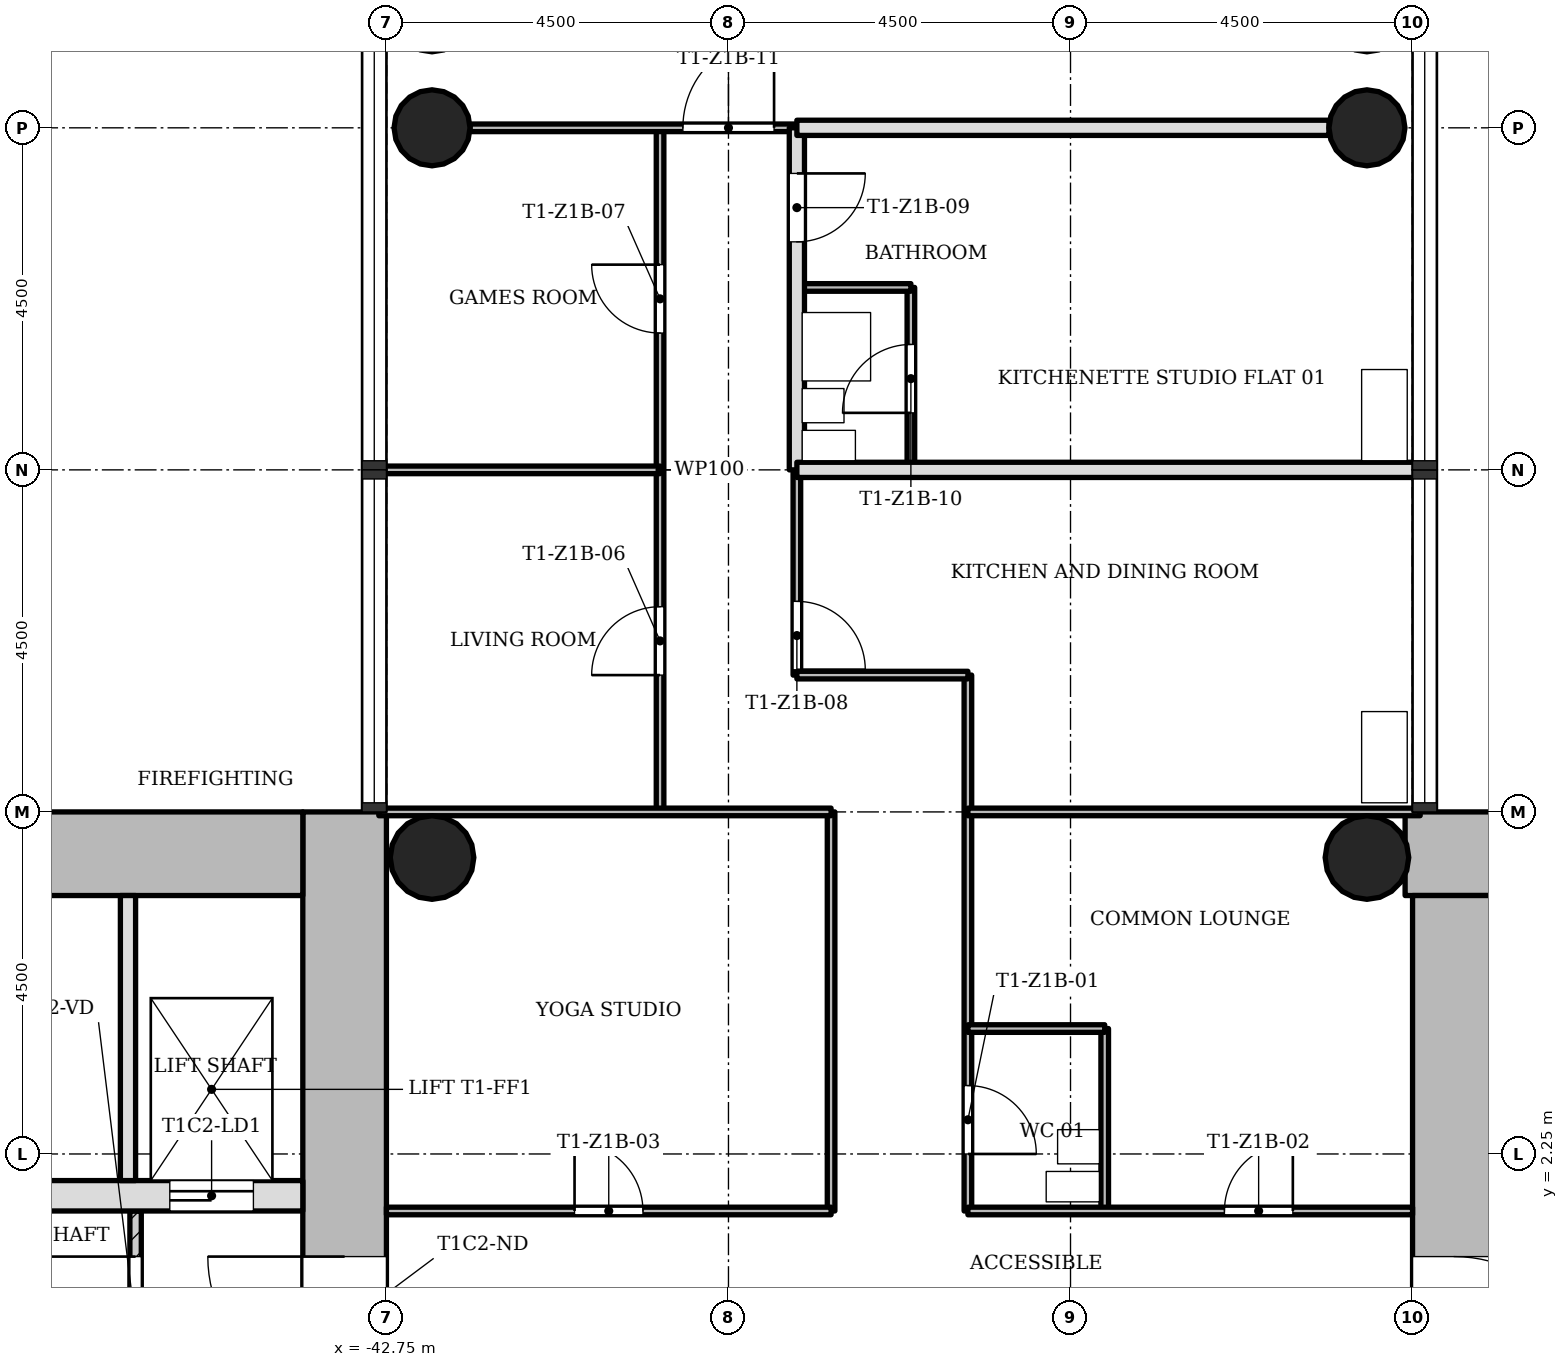
"""IFC4 building model, lengths in metres.
Left out: names, types, materials, properties, quantities, classifications, styles, units other than length and angle.
Written with IfcOpenShell. Run it as: python <this file> out.ifc"""

import sys

from ifc_helpers import new_model, si_unit, direction, frame, frame_2d, origin, origin_2d, place, context, subcontext, project, spatial, rectangle, hollow_circle, extrude, element, fill, save


model = new_model("IFC4")
c1 = context("Model", 3, precision=1e-05, world=origin(), true_north=direction((0.0, 1.0)))
c2 = subcontext(c1, "Body", "Model", "MODEL_VIEW")
j1 = project(units=[si_unit("LENGTHUNIT", "METRE"), si_unit("PLANEANGLEUNIT", "RADIAN")], contexts=[c1])
p1 = place(None, origin())
s1 = spatial("IfcSite", under=j1, at=p1, CompositionType="ELEMENT")
p2 = place(p1, origin())
s2 = spatial("IfcBuilding", under=s1, at=p2, CompositionType="ELEMENT")
p3 = place(p2, frame((0.0, 0.0, 34.7)))
s3 = spatial("IfcBuildingStorey", under=s2, at=p3, CompositionType="ELEMENT", Elevation=34.7)
p4 = place(p3, frame((-21.35, 6.2, 0.0), z_axis=(0.0, 0.0, 1.0), x_axis=(-1.0, 0.0, 0.0)))
e1 = element("IfcWall", 1, at=p4, inside=s3, PredefinedType="SHEAR", context=c2, shape_type="SweptSolid", body=[
    extrude(rectangle(XDim=7.998, YDim=1.1, at=frame_2d((3.999, 0.0))), origin(), (0.0, 0.0, 1.0), 3.4),
])
p5 = place(p3, frame((-28.7, 5.65, 0.0), z_axis=(0.0, 0.0, 1.0), x_axis=(0.0, -1.0, 0.0)))
e2 = element("IfcWall", 2, at=p5, inside=s3, PredefinedType="SHEAR", context=c2, shape_type="SweptSolid", body=[
    extrude(rectangle(XDim=12.4, YDim=1.1, at=frame_2d((6.2, 0.0))), origin(), (0.0, 0.0, 1.0), 3.4),
])
p6 = place(p5, frame((4.75, 0.0, 0.0)))
e3 = element("IfcOpeningElement", 3, at=p6, cuts=e2, PredefinedType="OPENING", context=c2, shape_type="SweptSolid", body=[
    extrude(rectangle(XDim=1.8, YDim=2.1, at=frame_2d((0.9, 1.05))), frame((0.0, 0.56, 0.0), z_axis=(0.0, -1.0, 0.0), x_axis=(1.0, 0.0, 0.0)), (0.0, 0.0, 1.0), 1.12),
])
p7 = place(p3, frame((-43.3, -5.65, 0.0), z_axis=(0.0, 0.0, 1.0), x_axis=(0.0, 1.0, 0.0)))
e4 = element("IfcWall", 4, at=p7, inside=s3, PredefinedType="SHEAR", context=c2, shape_type="SweptSolid", body=[
    extrude(rectangle(XDim=12.4, YDim=1.1, at=frame_2d((6.2, 0.0))), origin(), (0.0, 0.0, 1.0), 3.4),
])
p8 = place(p7, frame((4.75, 0.0, 0.0)))
e5 = element("IfcOpeningElement", 5, at=p8, cuts=e4, PredefinedType="OPENING", context=c2, shape_type="SweptSolid", body=[
    extrude(rectangle(XDim=1.8, YDim=2.1, at=frame_2d((0.9, 1.05))), frame((0.0, 0.56, 0.0), z_axis=(0.0, -1.0, 0.0), x_axis=(1.0, 0.0, 0.0)), (0.0, 0.0, 1.0), 1.12),
])
p9 = place(p3, frame((-43.85, 6.2, 0.0), z_axis=(0.0, 0.0, 1.0), x_axis=(-1.0, 0.0, 0.0)))
e6 = element("IfcWall", 6, at=p9, inside=s3, PredefinedType="SHEAR", context=c2, shape_type="SweptSolid", body=[
    extrude(rectangle(XDim=7.9, YDim=1.1, at=frame_2d((3.95, 0.0))), origin(), (0.0, 0.0, 1.0), 3.4),
])
p10 = place(p3, frame((-50.65, 1.7, 0.0), z_axis=(0.0, 0.0, 1.0), x_axis=(1.0, 0.0, 0.0)))
e7 = element("IfcWall", 7, at=p10, inside=s3, PredefinedType="SHEAR", context=c2, shape_type="SweptSolid", body=[
    extrude(rectangle(XDim=6.8, YDim=0.4, at=frame_2d((3.4, 0.0))), origin(), (0.0, 0.0, 1.0), 3.4),
])
p11 = place(p10, frame((5.05, 0.0, 0.0)))
e8 = element("IfcOpeningElement", 8, at=p11, cuts=e7, PredefinedType="OPENING", context=c2, shape_type="SweptSolid", body=[
    extrude(rectangle(XDim=1.1, YDim=2.1, at=frame_2d((0.55, 1.05))), frame((0.0, 0.21, 0.0), z_axis=(0.0, -1.0, 0.0), x_axis=(1.0, 0.0, 0.0)), (0.0, 0.0, 1.0), 0.42),
])
for number, where, z_axis, x_axis in (
    (9, (-29.85, 15.75, 0.0), (0.0, 0.0, 1.0), (1.0, 0.0, 0.0)),
    (10, (-42.15, 15.75, 0.0), (0.0, 0.0, 1.0), (1.0, 0.0, 0.0)),
):
    element("IfcColumn", number, at=place(p3, frame(where, z_axis=z_axis, x_axis=x_axis)), inside=s3, PredefinedType="COLUMN", context=c2, shape_type="SweptSolid", body=[
        extrude(hollow_circle(Radius=0.5, WallThickness=0.036, at=origin_2d()), origin(), (0.0, 0.0, 1.0), 3.4),
    ])
for number, where, z_axis, x_axis in (
    (11, (-29.85, 6.15, 0.0), (0.0, 0.0, 1.0), (1.0, 0.0, 0.0)),
    (12, (-42.15, 6.15, 0.0), (0.0, 0.0, 1.0), (1.0, 0.0, 0.0)),
):
    element("IfcColumn", number, at=place(p3, frame(where, z_axis=z_axis, x_axis=x_axis)), inside=s3, PredefinedType="COLUMN", context=c2, shape_type="SweptSolid", body=[
        extrude(hollow_circle(Radius=0.55, WallThickness=0.04, at=origin_2d()), origin(), (0.0, 0.0, 1.0), 3.4),
    ])
p12 = place(p3, frame((-46.05, 1.5, 0.0), z_axis=(0.0, 0.0, 1.0), x_axis=(0.0, -1.0, 0.0)))
e13 = element("IfcWall", 13, at=p12, inside=s3, PredefinedType="PARTITIONING", context=c2, shape_type="SweptSolid", body=[
    extrude(rectangle(XDim=3.0, YDim=0.15, at=frame_2d((1.5, 0.0))), origin(), (0.0, 0.0, 1.0), 3.0),
])
p13 = place(p12, frame((0.6, 0.0, 0.0)))
e14 = element("IfcOpeningElement", 14, at=p13, cuts=e13, PredefinedType="OPENING", context=c2, shape_type="SweptSolid", body=[
    extrude(rectangle(XDim=1.8, YDim=2.1, at=frame_2d((0.9, 1.05))), frame((0.0, 0.085, 0.0), z_axis=(0.0, -1.0, 0.0), x_axis=(1.0, 0.0, 0.0)), (0.0, 0.0, 1.0), 0.17),
])
p14 = place(p3, frame((-46.15, 5.65, 0.0), z_axis=(0.0, 0.0, 1.0), x_axis=(0.0, -1.0, 0.0)))
e15 = element("IfcWall", 15, at=p14, inside=s3, PredefinedType="SOLIDWALL", context=c2, shape_type="SweptSolid", body=[
    extrude(rectangle(XDim=3.75, YDim=0.2, at=frame_2d((1.875, 0.0))), origin(), (0.0, 0.0, 1.0), 3.0),
])
p15 = place(p3, frame((-39.15, 6.75, 0.0), z_axis=(0.0, 0.0, 1.0), x_axis=(0.0, 1.0, 0.0)))
e16 = element("IfcWall", 16, at=p15, inside=s3, PredefinedType="PARTITIONING", context=c2, shape_type="SweptSolid", body=[
    extrude(rectangle(XDim=9.0, YDim=0.1, at=frame_2d((4.5, 0.0))), origin(), (0.0, 0.0, 1.0), 3.0),
])
p16 = place(p15, frame((1.8, 0.0, 0.0)))
e17 = element("IfcOpeningElement", 17, at=p16, cuts=e16, PredefinedType="OPENING", context=c2, shape_type="SweptSolid", body=[
    extrude(rectangle(XDim=0.9, YDim=2.1, at=frame_2d((0.45, 1.05))), frame((0.0, 0.06, 0.0), z_axis=(0.0, -1.0, 0.0), x_axis=(1.0, 0.0, 0.0)), (0.0, 0.0, 1.0), 0.12),
])
p17 = place(p15, frame((6.3, 0.0, 0.0)))
e18 = element("IfcOpeningElement", 18, at=p17, cuts=e16, PredefinedType="OPENING", context=c2, shape_type="SweptSolid", body=[
    extrude(rectangle(XDim=0.9, YDim=2.1, at=frame_2d((0.45, 1.05))), frame((0.0, 0.06, 0.0), z_axis=(0.0, -1.0, 0.0), x_axis=(1.0, 0.0, 0.0)), (0.0, 0.0, 1.0), 0.12),
])
p18 = place(p3, frame((-37.35, 8.55, 0.0), z_axis=(0.0, 0.0, 1.0), x_axis=(0.0, 1.0, 0.0)))
e19 = element("IfcWall", 19, at=p18, inside=s3, PredefinedType="PARTITIONING", context=c2, shape_type="SweptSolid", body=[
    extrude(rectangle(XDim=2.7, YDim=0.1, at=frame_2d((1.35, 0.0))), origin(), (0.0, 0.0, 1.0), 3.0),
])
p19 = place(p18, frame((0.07, 0.0, 0.0)))
e20 = element("IfcOpeningElement", 20, at=p19, cuts=e19, PredefinedType="OPENING", context=c2, shape_type="SweptSolid", body=[
    extrude(rectangle(XDim=0.9, YDim=2.1, at=frame_2d((0.45, 1.05))), frame((0.0, 0.06, 0.0), z_axis=(0.0, -1.0, 0.0), x_axis=(1.0, 0.0, 0.0)), (0.0, 0.0, 1.0), 0.12),
])
p20 = place(p3, frame((-37.35, 11.25, 0.0), z_axis=(0.0, 0.0, 1.0), x_axis=(0.0, 1.0, 0.0)))
e21 = element("IfcWall", 21, at=p20, inside=s3, PredefinedType="SOLIDWALL", context=c2, shape_type="SweptSolid", body=[
    extrude(rectangle(XDim=4.5, YDim=0.2, at=frame_2d((2.25, 0.0))), origin(), (0.0, 0.0, 1.0), 3.0),
])
p21 = place(p20, frame((3.0, 0.0, 0.0)))
e22 = element("IfcOpeningElement", 22, at=p21, cuts=e21, PredefinedType="OPENING", context=c2, shape_type="SweptSolid", body=[
    extrude(rectangle(XDim=0.9, YDim=2.1, at=frame_2d((0.45, 1.05))), frame((0.0, 0.11, 0.0), z_axis=(0.0, -1.0, 0.0), x_axis=(1.0, 0.0, 0.0)), (0.0, 0.0, 1.0), 0.22),
])
p22 = place(p3, frame((-36.9, 1.5, 0.0), z_axis=(0.0, 0.0, 1.0), x_axis=(0.0, 1.0, 0.0)))
e23 = element("IfcWall", 23, at=p22, inside=s3, PredefinedType="PARTITIONING", context=c2, shape_type="SweptSolid", body=[
    extrude(rectangle(XDim=5.25, YDim=0.1, at=frame_2d((2.625, 0.0))), origin(), (0.0, 0.0, 1.0), 3.0),
])
p23 = place(p3, frame((-35.85, 11.25, 0.0), z_axis=(0.0, 0.0, 1.0), x_axis=(0.0, 1.0, 0.0)))
e24 = element("IfcWall", 24, at=p23, inside=s3, PredefinedType="PARTITIONING", context=c2, shape_type="SweptSolid", body=[
    extrude(rectangle(XDim=2.4, YDim=0.1, at=frame_2d((1.2, 0.0))), origin(), (0.0, 0.0, 1.0), 3.0),
])
p24 = place(p23, frame((0.75, 0.0, 0.0)))
e25 = element("IfcOpeningElement", 25, at=p24, cuts=e24, PredefinedType="OPENING", context=c2, shape_type="SweptSolid", body=[
    extrude(rectangle(XDim=0.9, YDim=2.1, at=frame_2d((0.45, 1.05))), frame((0.0, 0.06, 0.0), z_axis=(0.0, -1.0, 0.0), x_axis=(1.0, 0.0, 0.0)), (0.0, 0.0, 1.0), 0.12),
])
p25 = place(p3, frame((-35.1, 1.5, 0.0), z_axis=(0.0, 0.0, 1.0), x_axis=(0.0, 1.0, 0.0)))
e26 = element("IfcWall", 26, at=p25, inside=s3, PredefinedType="PARTITIONING", context=c2, shape_type="SweptSolid", body=[
    extrude(rectangle(XDim=7.05, YDim=0.1, at=frame_2d((3.525, 0.0))), origin(), (0.0, 0.0, 1.0), 3.0),
])
p26 = place(p25, frame((0.75, 0.0, 0.0)))
e27 = element("IfcOpeningElement", 27, at=p26, cuts=e26, PredefinedType="OPENING", context=c2, shape_type="SweptSolid", body=[
    extrude(rectangle(XDim=0.9, YDim=2.1, at=frame_2d((0.45, 1.05))), frame((0.0, 0.06, 0.0), z_axis=(0.0, -1.0, 0.0), x_axis=(1.0, 0.0, 0.0)), (0.0, 0.0, 1.0), 0.12),
])
p27 = place(p3, frame((-33.3, 1.5, 0.0), z_axis=(0.0, 0.0, 1.0), x_axis=(0.0, 1.0, 0.0)))
e28 = element("IfcWall", 28, at=p27, inside=s3, PredefinedType="PARTITIONING", context=c2, shape_type="SweptSolid", body=[
    extrude(rectangle(XDim=2.4, YDim=0.1, at=frame_2d((1.2, 0.0))), origin(), (0.0, 0.0, 1.0), 3.0),
])
p28 = place(p3, frame((-42.75, 1.5, 0.0), z_axis=(0.0, 0.0, 1.0), x_axis=(1.0, 0.0, 0.0)))
e29 = element("IfcWall", 29, at=p28, inside=s3, PredefinedType="PARTITIONING", context=c2, shape_type="SweptSolid", body=[
    extrude(rectangle(XDim=5.85, YDim=0.1, at=frame_2d((2.925, 0.0))), origin(), (0.0, 0.0, 1.0), 3.0),
])
p29 = place(p28, frame((2.475, 0.0, 0.0)))
e30 = element("IfcOpeningElement", 30, at=p29, cuts=e29, PredefinedType="OPENING", context=c2, shape_type="SweptSolid", body=[
    extrude(rectangle(XDim=0.9, YDim=2.1, at=frame_2d((0.45, 1.05))), frame((0.0, 0.06, 0.0), z_axis=(0.0, -1.0, 0.0), x_axis=(1.0, 0.0, 0.0)), (0.0, 0.0, 1.0), 0.12),
])
p30 = place(p3, frame((-35.1, 1.5, 0.0), z_axis=(0.0, 0.0, 1.0), x_axis=(1.0, 0.0, 0.0)))
e31 = element("IfcWall", 31, at=p30, inside=s3, PredefinedType="PARTITIONING", context=c2, shape_type="SweptSolid", body=[
    extrude(rectangle(XDim=5.85, YDim=0.1, at=frame_2d((2.925, 0.0))), origin(), (0.0, 0.0, 1.0), 3.0),
])
p31 = place(p30, frame((3.375, 0.0, 0.0)))
e32 = element("IfcOpeningElement", 32, at=p31, cuts=e31, PredefinedType="OPENING", context=c2, shape_type="SweptSolid", body=[
    extrude(rectangle(XDim=0.9, YDim=2.1, at=frame_2d((0.45, 1.05))), frame((0.0, 0.06, 0.0), z_axis=(0.0, -1.0, 0.0), x_axis=(1.0, 0.0, 0.0)), (0.0, 0.0, 1.0), 0.12),
])
p32 = place(p3, frame((-35.1, 3.9, 0.0), z_axis=(0.0, 0.0, 1.0), x_axis=(1.0, 0.0, 0.0)))
e33 = element("IfcWall", 33, at=p32, inside=s3, PredefinedType="PARTITIONING", context=c2, shape_type="SweptSolid", body=[
    extrude(rectangle(XDim=1.8, YDim=0.1, at=frame_2d((0.9, 0.0))), origin(), (0.0, 0.0, 1.0), 3.0),
])
for number, where, z_axis, x_axis in (
    (34, (-42.85, 6.75, 0.0), (0.0, 0.0, 1.0), (1.0, 0.0, 0.0)),
    (35, (-35.1, 6.75, 0.0), (0.0, 0.0, 1.0), (1.0, 0.0, 0.0)),
):
    element("IfcWall", number, at=place(p3, frame(where, z_axis=z_axis, x_axis=x_axis)), inside=s3, PredefinedType="PARTITIONING", context=c2, shape_type="SweptSolid", body=[
        extrude(rectangle(XDim=5.95, YDim=0.1, at=frame_2d((2.975, 0.0))), origin(), (0.0, 0.0, 1.0), 3.0),
    ])
p33 = place(p3, frame((-37.35, 8.55, 0.0), z_axis=(0.0, 0.0, 1.0), x_axis=(1.0, 0.0, 0.0)))
e36 = element("IfcWall", 36, at=p33, inside=s3, PredefinedType="PARTITIONING", context=c2, shape_type="SweptSolid", body=[
    extrude(rectangle(XDim=2.25, YDim=0.1, at=frame_2d((1.125, 0.0))), origin(), (0.0, 0.0, 1.0), 3.0),
])
p34 = place(p3, frame((-42.85, 11.25, 0.0), z_axis=(0.0, 0.0, 1.0), x_axis=(1.0, 0.0, 0.0)))
e37 = element("IfcWall", 37, at=p34, inside=s3, PredefinedType="PARTITIONING", context=c2, shape_type="SweptSolid", body=[
    extrude(rectangle(XDim=3.7, YDim=0.1, at=frame_2d((1.85, 0.0))), origin(), (0.0, 0.0, 1.0), 3.0),
])
p35 = place(p3, frame((-37.35, 11.25, 0.0), z_axis=(0.0, 0.0, 1.0), x_axis=(1.0, 0.0, 0.0)))
e38 = element("IfcWall", 38, at=p35, inside=s3, PredefinedType="SOLIDWALL", context=c2, shape_type="SweptSolid", body=[
    extrude(rectangle(XDim=8.2, YDim=0.2, at=frame_2d((4.1, 0.0))), origin(), (0.0, 0.0, 1.0), 3.0),
])
p36 = place(p3, frame((-37.35, 13.65, 0.0), z_axis=(0.0, 0.0, 1.0), x_axis=(1.0, 0.0, 0.0)))
e39 = element("IfcWall", 39, at=p36, inside=s3, PredefinedType="PARTITIONING", context=c2, shape_type="SweptSolid", body=[
    extrude(rectangle(XDim=1.5, YDim=0.1, at=frame_2d((0.75, 0.0))), origin(), (0.0, 0.0, 1.0), 3.0),
])
p37 = place(p3, frame((-41.65, 15.75, 0.0), z_axis=(0.0, 0.0, 1.0), x_axis=(1.0, 0.0, 0.0)))
e40 = element("IfcWall", 40, at=p37, inside=s3, PredefinedType="PARTITIONING", context=c2, shape_type="SweptSolid", body=[
    extrude(rectangle(XDim=4.3, YDim=0.1, at=frame_2d((2.15, 0.0))), origin(), (0.0, 0.0, 1.0), 3.0),
])
p38 = place(p37, frame((2.8, 0.0, 0.0)))
e41 = element("IfcOpeningElement", 41, at=p38, cuts=e40, PredefinedType="OPENING", context=c2, shape_type="SweptSolid", body=[
    extrude(rectangle(XDim=1.2, YDim=2.1, at=frame_2d((0.6, 1.05))), frame((0.0, 0.06, 0.0), z_axis=(0.0, -1.0, 0.0), x_axis=(1.0, 0.0, 0.0)), (0.0, 0.0, 1.0), 0.12),
])
p39 = place(p3, frame((-37.35, 15.75, 0.0), z_axis=(0.0, 0.0, 1.0), x_axis=(1.0, 0.0, 0.0)))
e42 = element("IfcWall", 42, at=p39, inside=s3, PredefinedType="SOLIDWALL", context=c2, shape_type="SweptSolid", body=[
    extrude(rectangle(XDim=7.0, YDim=0.2, at=frame_2d((3.5, 0.0))), origin(), (0.0, 0.0, 1.0), 3.0),
])
p40 = place(p13, origin())
e43 = element("IfcDoor", 43, at=p40, inside=s3, OperationType="SINGLE_SWING_LEFT", PredefinedType="DOOR", context=c2, shape_type="SweptSolid", body=[
    extrude(rectangle(XDim=1.8, YDim=2.1, at=frame_2d((0.9, 1.05))), frame((0.0, 0.025, 0.0), z_axis=(0.0, -1.0, 0.0), x_axis=(1.0, 0.0, 0.0)), (0.0, 0.0, 1.0), 0.05),
])
fill(e14, e43)
p41 = place(p26, origin())
e44 = element("IfcDoor", 44, at=p41, inside=s3, OperationType="SINGLE_SWING_LEFT", PredefinedType="DOOR", context=c2, shape_type="SweptSolid", body=[
    extrude(rectangle(XDim=0.9, YDim=2.1, at=frame_2d((0.45, 1.05))), frame((0.0, 0.025, 0.0), z_axis=(0.0, -1.0, 0.0), x_axis=(1.0, 0.0, 0.0)), (0.0, 0.0, 1.0), 0.05),
])
fill(e27, e44)
p42 = place(p31, origin())
e45 = element("IfcDoor", 45, at=p42, inside=s3, OperationType="SINGLE_SWING_LEFT", PredefinedType="DOOR", context=c2, shape_type="SweptSolid", body=[
    extrude(rectangle(XDim=0.9, YDim=2.1, at=frame_2d((0.45, 1.05))), frame((0.0, 0.025, 0.0), z_axis=(0.0, -1.0, 0.0), x_axis=(1.0, 0.0, 0.0)), (0.0, 0.0, 1.0), 0.05),
])
fill(e32, e45)
p43 = place(p29, origin())
e46 = element("IfcDoor", 46, at=p43, inside=s3, OperationType="SINGLE_SWING_RIGHT", PredefinedType="DOOR", context=c2, shape_type="SweptSolid", body=[
    extrude(rectangle(XDim=0.9, YDim=2.1, at=frame_2d((0.45, 1.05))), frame((0.0, 0.025, 0.0), z_axis=(0.0, -1.0, 0.0), x_axis=(1.0, 0.0, 0.0)), (0.0, 0.0, 1.0), 0.05),
])
fill(e30, e46)
p44 = place(p16, origin())
e47 = element("IfcDoor", 47, at=p44, inside=s3, OperationType="SINGLE_SWING_RIGHT", PredefinedType="DOOR", context=c2, shape_type="SweptSolid", body=[
    extrude(rectangle(XDim=0.9, YDim=2.1, at=frame_2d((0.45, 1.05))), frame((0.0, 0.025, 0.0), z_axis=(0.0, -1.0, 0.0), x_axis=(1.0, 0.0, 0.0)), (0.0, 0.0, 1.0), 0.05),
])
fill(e17, e47)
p45 = place(p17, origin())
e48 = element("IfcDoor", 48, at=p45, inside=s3, OperationType="SINGLE_SWING_LEFT", PredefinedType="DOOR", context=c2, shape_type="SweptSolid", body=[
    extrude(rectangle(XDim=0.9, YDim=2.1, at=frame_2d((0.45, 1.05))), frame((0.0, 0.025, 0.0), z_axis=(0.0, -1.0, 0.0), x_axis=(1.0, 0.0, 0.0)), (0.0, 0.0, 1.0), 0.05),
])
fill(e18, e48)
p46 = place(p19, origin())
e49 = element("IfcDoor", 49, at=p46, inside=s3, OperationType="SINGLE_SWING_LEFT", PredefinedType="DOOR", context=c2, shape_type="SweptSolid", body=[
    extrude(rectangle(XDim=0.9, YDim=2.1, at=frame_2d((0.45, 1.05))), frame((0.0, 0.025, 0.0), z_axis=(0.0, -1.0, 0.0), x_axis=(1.0, 0.0, 0.0)), (0.0, 0.0, 1.0), 0.05),
])
fill(e20, e49)
p47 = place(p21, origin())
e50 = element("IfcDoor", 50, at=p47, inside=s3, OperationType="SINGLE_SWING_RIGHT", PredefinedType="DOOR", context=c2, shape_type="SweptSolid", body=[
    extrude(rectangle(XDim=0.9, YDim=2.1, at=frame_2d((0.45, 1.05))), frame((0.0, 0.025, 0.0), z_axis=(0.0, -1.0, 0.0), x_axis=(1.0, 0.0, 0.0)), (0.0, 0.0, 1.0), 0.05),
])
fill(e22, e50)
p48 = place(p24, origin())
e51 = element("IfcDoor", 51, at=p48, inside=s3, OperationType="SINGLE_SWING_RIGHT", PredefinedType="DOOR", context=c2, shape_type="SweptSolid", body=[
    extrude(rectangle(XDim=0.9, YDim=2.1, at=frame_2d((0.45, 1.05))), frame((0.0, 0.025, 0.0), z_axis=(0.0, -1.0, 0.0), x_axis=(1.0, 0.0, 0.0)), (0.0, 0.0, 1.0), 0.05),
])
fill(e25, e51)
p49 = place(p38, origin())
e52 = element("IfcDoor", 52, at=p49, inside=s3, OperationType="SINGLE_SWING_LEFT", PredefinedType="DOOR", context=c2, shape_type="SweptSolid", body=[
    extrude(rectangle(XDim=1.2, YDim=2.1, at=frame_2d((0.6, 1.05))), frame((0.0, 0.025, 0.0), z_axis=(0.0, -1.0, 0.0), x_axis=(1.0, 0.0, 0.0)), (0.0, 0.0, 1.0), 0.05),
])
fill(e41, e52)
p50 = place(p6, origin())
e53 = element("IfcDoor", 53, at=p50, inside=s3, OperationType="SINGLE_SWING_LEFT", PredefinedType="DOOR", context=c2, shape_type="SweptSolid", body=[
    extrude(rectangle(XDim=1.8, YDim=2.1, at=frame_2d((0.9, 1.05))), frame((0.0, 0.025, 0.0), z_axis=(0.0, -1.0, 0.0), x_axis=(1.0, 0.0, 0.0)), (0.0, 0.0, 1.0), 0.05),
])
fill(e3, e53)
p51 = place(p11, origin())
e54 = element("IfcDoor", 54, at=p51, inside=s3, OperationType="SLIDING_TO_LEFT", PredefinedType="DOOR", context=c2, shape_type="SweptSolid", body=[
    extrude(rectangle(XDim=1.1, YDim=2.1, at=frame_2d((0.55, 1.05))), frame((0.0, 0.025, 0.0), z_axis=(0.0, -1.0, 0.0), x_axis=(1.0, 0.0, 0.0)), (0.0, 0.0, 1.0), 0.05),
])
fill(e8, e54)
p52 = place(p8, origin())
e55 = element("IfcDoor", 55, at=p52, inside=s3, OperationType="SINGLE_SWING_LEFT", PredefinedType="DOOR", context=c2, shape_type="SweptSolid", body=[
    extrude(rectangle(XDim=1.8, YDim=2.1, at=frame_2d((0.9, 1.05))), frame((0.0, 0.025, 0.0), z_axis=(0.0, -1.0, 0.0), x_axis=(1.0, 0.0, 0.0)), (0.0, 0.0, 1.0), 0.05),
])
fill(e5, e55)
save(model, sys.argv[1])
